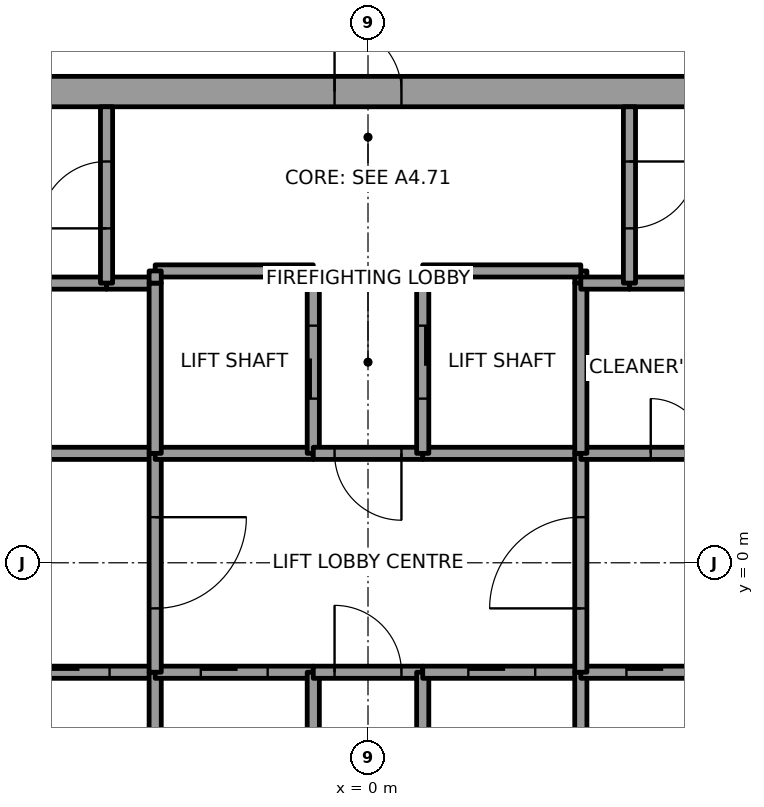
"""IFC4 building model, lengths in metres.
Left out: names, types, materials, properties, quantities, classifications, styles, units other than length and angle.
Written with IfcOpenShell. Run it as: python <this file> out.ifc"""

import sys

from ifc_helpers import new_model, si_unit, direction, frame, frame_2d, origin, place, context, subcontext, project, spatial, rectangle, extrude, element, fill, save


model = new_model("IFC4")
c1 = context("Model", 3, precision=1e-05, world=origin(), true_north=direction((0.0, 1.0)))
c2 = subcontext(c1, "Body", "Model", "MODEL_VIEW")
j1 = project(units=[si_unit("LENGTHUNIT", "METRE"), si_unit("PLANEANGLEUNIT", "RADIAN")], contexts=[c1])
p1 = place(None, origin())
s1 = spatial("IfcSite", under=j1, at=p1, CompositionType="ELEMENT")
p2 = place(p1, origin())
s2 = spatial("IfcBuilding", under=s1, at=p2, CompositionType="ELEMENT")
p3 = place(p2, frame((0.0, 0.0, 303.0)))
s3 = spatial("IfcBuildingStorey", under=s2, at=p3, CompositionType="ELEMENT", Elevation=303.0)
p4 = place(p3, frame((-11.0, 7.75, 0.0), z_axis=(0.0, 0.0, 1.0), x_axis=(1.0, 0.0, 0.0)))
e1 = element("IfcWall", 1, at=p4, inside=s3, PredefinedType="SHEAR", context=c2, shape_type="SweptSolid", body=[
    extrude(rectangle(XDim=22.0, YDim=0.5, at=frame_2d((11.0, 0.0))), origin(), (0.0, 0.0, 1.0), 4.0),
])
p5 = place(p4, frame((10.45, 0.0, 0.0)))
e2 = element("IfcOpeningElement", 2, at=p5, cuts=e1, PredefinedType="OPENING", context=c2, shape_type="SweptSolid", body=[
    extrude(rectangle(XDim=1.1, YDim=2.1, at=frame_2d((0.55, 1.05))), frame((0.0, 0.25, 0.0), z_axis=(0.0, -1.0, 0.0), x_axis=(1.0, 0.0, 0.0)), (0.0, 0.0, 1.0), 0.5),
])
p6 = place(p3, frame((-8.7, 1.8, 0.0), z_axis=(0.0, 0.0, 1.0), x_axis=(1.0, 0.0, 0.0)))
e3 = element("IfcWall", 3, at=p6, inside=s3, PredefinedType="SOLIDWALL", context=c2, shape_type="SweptSolid", body=[
    extrude(rectangle(XDim=5.2, YDim=0.2, at=frame_2d((2.6, 0.0))), origin(), (0.0, 0.0, 1.0), 3.85),
])
p7 = place(p6, frame((2.15, 0.0, 0.0)))
e4 = element("IfcOpeningElement", 4, at=p7, cuts=e3, PredefinedType="OPENING", context=c2, shape_type="SweptSolid", body=[
    extrude(rectangle(XDim=0.9, YDim=2.1, at=frame_2d((0.45, 1.05))), frame((0.0, 0.1, 0.0), z_axis=(0.0, -1.0, 0.0), x_axis=(1.0, 0.0, 0.0)), (0.0, 0.0, 1.0), 0.2),
])
p8 = place(p3, frame((-4.3, 4.6, 0.0), z_axis=(0.0, 0.0, 1.0), x_axis=(-1.0, 0.0, 0.0)))
e5 = element("IfcWall", 5, at=p8, inside=s3, PredefinedType="SOLIDWALL", context=c2, shape_type="SweptSolid", body=[
    extrude(rectangle(XDim=4.4, YDim=0.2, at=frame_2d((2.2, 0.0))), origin(), (0.0, 0.0, 1.0), 3.85),
])
p9 = place(p3, frame((-6.1, -1.8, 0.0), z_axis=(0.0, 0.0, 1.0), x_axis=(1.0, 0.0, 0.0)))
e6 = element("IfcWall", 6, at=p9, inside=s3, PredefinedType="SOLIDWALL", context=c2, shape_type="SweptSolid", body=[
    extrude(rectangle(XDim=2.6, YDim=0.2, at=frame_2d((1.3, 0.0))), origin(), (0.0, 0.0, 1.0), 3.85),
])
p10 = place(p9, frame((0.75, 0.0, 0.0)))
e7 = element("IfcOpeningElement", 7, at=p10, cuts=e6, PredefinedType="OPENING", context=c2, shape_type="SweptSolid", body=[
    extrude(rectangle(XDim=1.1, YDim=2.1, at=frame_2d((0.55, 1.05))), frame((0.0, 0.1, 0.0), z_axis=(0.0, -1.0, 0.0), x_axis=(1.0, 0.0, 0.0)), (0.0, 0.0, 1.0), 0.2),
])
p11 = place(p3, frame((-3.5, 4.6, 0.0), z_axis=(0.0, 0.0, 1.0), x_axis=(-1.0, 0.0, 0.0)))
e8 = element("IfcWall", 8, at=p11, inside=s3, PredefinedType="SOLIDWALL", context=c2, shape_type="SweptSolid", body=[
    extrude(rectangle(XDim=0.8, YDim=0.2, at=frame_2d((0.4, 0.0))), origin(), (0.0, 0.0, 1.0), 3.85),
])
p12 = place(p3, frame((-4.3, 4.6, 0.0), z_axis=(0.0, 0.0, 1.0), x_axis=(0.0, 1.0, 0.0)))
e9 = element("IfcWall", 9, at=p12, inside=s3, PredefinedType="SOLIDWALL", context=c2, shape_type="SweptSolid", body=[
    extrude(rectangle(XDim=2.9, YDim=0.2, at=frame_2d((1.45, 0.0))), origin(), (0.0, 0.0, 1.0), 3.85),
])
p13 = place(p12, frame((0.9, 0.0, 0.0)))
e10 = element("IfcOpeningElement", 10, at=p13, cuts=e9, PredefinedType="OPENING", context=c2, shape_type="SweptSolid", body=[
    extrude(rectangle(XDim=1.1, YDim=2.1, at=frame_2d((0.55, 1.05))), frame((0.0, 0.1, 0.0), z_axis=(0.0, -1.0, 0.0), x_axis=(1.0, 0.0, 0.0)), (0.0, 0.0, 1.0), 0.2),
])
p14 = place(p3, frame((-3.5, -4.6, 0.0), z_axis=(0.0, 0.0, 1.0), x_axis=(0.0, 1.0, 0.0)))
e11 = element("IfcWall", 11, at=p14, inside=s3, PredefinedType="SOLIDWALL", context=c2, shape_type="SweptSolid", body=[
    extrude(rectangle(XDim=2.8, YDim=0.2, at=frame_2d((1.4, 0.0))), origin(), (0.0, 0.0, 1.0), 3.85),
])
p15 = place(p3, frame((-3.5, -1.8, 0.0), z_axis=(0.0, 0.0, 1.0), x_axis=(1.0, 0.0, 0.0)))
e12 = element("IfcWall", 12, at=p15, inside=s3, PredefinedType="SOLIDWALL", context=c2, shape_type="SweptSolid", body=[
    extrude(rectangle(XDim=2.6, YDim=0.2, at=frame_2d((1.3, 0.0))), origin(), (0.0, 0.0, 1.0), 3.85),
])
p16 = place(p15, frame((0.75, 0.0, 0.0)))
e13 = element("IfcOpeningElement", 13, at=p16, cuts=e12, PredefinedType="OPENING", context=c2, shape_type="SweptSolid", body=[
    extrude(rectangle(XDim=1.1, YDim=2.1, at=frame_2d((0.55, 1.05))), frame((0.0, 0.1, 0.0), z_axis=(0.0, -1.0, 0.0), x_axis=(1.0, 0.0, 0.0)), (0.0, 0.0, 1.0), 0.2),
])
p17 = place(p3, frame((-3.5, 1.8, 0.0), z_axis=(0.0, 0.0, 1.0), x_axis=(0.0, -1.0, 0.0)))
e14 = element("IfcWall", 14, at=p17, inside=s3, PredefinedType="SOLIDWALL", context=c2, shape_type="SweptSolid", body=[
    extrude(rectangle(XDim=3.6, YDim=0.2, at=frame_2d((1.8, 0.0))), origin(), (0.0, 0.0, 1.0), 3.85),
])
p18 = place(p17, frame((1.05, 0.0, 0.0)))
e15 = element("IfcOpeningElement", 15, at=p18, cuts=e14, PredefinedType="OPENING", context=c2, shape_type="SweptSolid", body=[
    extrude(rectangle(XDim=1.5, YDim=2.1, at=frame_2d((0.75, 1.05))), frame((0.0, 0.1, 0.0), z_axis=(0.0, -1.0, 0.0), x_axis=(1.0, 0.0, 0.0)), (0.0, 0.0, 1.0), 0.2),
])
p19 = place(p3, frame((-0.9, 1.8, 0.0), z_axis=(0.0, 0.0, 1.0), x_axis=(-1.0, 0.0, 0.0)))
e16 = element("IfcWall", 16, at=p19, inside=s3, PredefinedType="SOLIDWALL", context=c2, shape_type="SweptSolid", body=[
    extrude(rectangle(XDim=2.6, YDim=0.2, at=frame_2d((1.3, 0.0))), origin(), (0.0, 0.0, 1.0), 3.85),
])
p20 = place(p3, frame((-3.5, 1.8, 0.0), z_axis=(0.0, 0.0, 1.0), x_axis=(0.0, 1.0, 0.0)))
e17 = element("IfcWall", 17, at=p20, inside=s3, PredefinedType="SOLIDWALL", context=c2, shape_type="SweptSolid", body=[
    extrude(rectangle(XDim=2.8, YDim=0.2, at=frame_2d((1.4, 0.0))), origin(), (0.0, 0.0, 1.0), 3.85),
])
p21 = place(p3, frame((-0.9, 1.8, 0.0), z_axis=(0.0, 0.0, 1.0), x_axis=(0.0, 1.0, 0.0)))
e18 = element("IfcWall", 18, at=p21, inside=s3, PredefinedType="SOLIDWALL", context=c2, shape_type="SweptSolid", body=[
    extrude(rectangle(XDim=3.0, YDim=0.2, at=frame_2d((1.5, 0.0))), origin(), (0.0, 0.0, 1.0), 3.85),
])
p22 = place(p21, frame((0.9, 0.0, 0.0)))
e19 = element("IfcOpeningElement", 19, at=p22, cuts=e18, PredefinedType="OPENING", context=c2, shape_type="SweptSolid", body=[
    extrude(rectangle(XDim=1.2, YDim=2.1, at=frame_2d((0.6, 1.05))), frame((0.0, 0.1, 0.0), z_axis=(0.0, -1.0, 0.0), x_axis=(1.0, 0.0, 0.0)), (0.0, 0.0, 1.0), 0.2),
])
p23 = place(p3, frame((-0.9, 4.8, 0.0), z_axis=(0.0, 0.0, 1.0), x_axis=(-1.0, 0.0, 0.0)))
e20 = element("IfcWall", 20, at=p23, inside=s3, PredefinedType="SOLIDWALL", context=c2, shape_type="SweptSolid", body=[
    extrude(rectangle(XDim=2.6, YDim=0.2, at=frame_2d((1.3, 0.0))), origin(), (0.0, 0.0, 1.0), 3.85),
])
p24 = place(p3, frame((-3.5, 4.8, 0.0), z_axis=(0.0, 0.0, 1.0), x_axis=(0.0, -1.0, 0.0)))
e21 = element("IfcWall", 21, at=p24, inside=s3, PredefinedType="SOLIDWALL", context=c2, shape_type="SweptSolid", body=[
    extrude(rectangle(XDim=0.2, YDim=0.2, at=frame_2d((0.1, 0.0))), origin(), (0.0, 0.0, 1.0), 3.85),
])
p25 = place(p3, frame((-0.9, -4.6, 0.0), z_axis=(0.0, 0.0, 1.0), x_axis=(0.0, 1.0, 0.0)))
e22 = element("IfcWall", 22, at=p25, inside=s3, PredefinedType="SOLIDWALL", context=c2, shape_type="SweptSolid", body=[
    extrude(rectangle(XDim=2.8, YDim=0.2, at=frame_2d((1.4, 0.0))), origin(), (0.0, 0.0, 1.0), 3.85),
])
p26 = place(p3, frame((-0.9, -1.8, 0.0), z_axis=(0.0, 0.0, 1.0), x_axis=(1.0, 0.0, 0.0)))
e23 = element("IfcWall", 23, at=p26, inside=s3, PredefinedType="SOLIDWALL", context=c2, shape_type="SweptSolid", body=[
    extrude(rectangle(XDim=1.8, YDim=0.2, at=frame_2d((0.9, 0.0))), origin(), (0.0, 0.0, 1.0), 3.85),
])
p27 = place(p26, frame((0.35, 0.0, 0.0)))
e24 = element("IfcOpeningElement", 24, at=p27, cuts=e23, PredefinedType="OPENING", context=c2, shape_type="SweptSolid", body=[
    extrude(rectangle(XDim=1.1, YDim=2.1, at=frame_2d((0.55, 1.05))), frame((0.0, 0.1, 0.0), z_axis=(0.0, -1.0, 0.0), x_axis=(1.0, 0.0, 0.0)), (0.0, 0.0, 1.0), 0.2),
])
p28 = place(p3, frame((0.9, 1.8, 0.0), z_axis=(0.0, 0.0, 1.0), x_axis=(-1.0, 0.0, 0.0)))
e25 = element("IfcWall", 25, at=p28, inside=s3, PredefinedType="SOLIDWALL", context=c2, shape_type="SweptSolid", body=[
    extrude(rectangle(XDim=1.8, YDim=0.2, at=frame_2d((0.9, 0.0))), origin(), (0.0, 0.0, 1.0), 3.85),
])
p29 = place(p28, frame((0.35, 0.0, 0.0)))
e26 = element("IfcOpeningElement", 26, at=p29, cuts=e25, PredefinedType="OPENING", context=c2, shape_type="SweptSolid", body=[
    extrude(rectangle(XDim=1.1, YDim=2.1, at=frame_2d((0.55, 1.05))), frame((0.0, 0.1, 0.0), z_axis=(0.0, -1.0, 0.0), x_axis=(1.0, 0.0, 0.0)), (0.0, 0.0, 1.0), 0.2),
])
p30 = place(p3, frame((0.9, -1.8, 0.0), z_axis=(0.0, 0.0, 1.0), x_axis=(0.0, -1.0, 0.0)))
e27 = element("IfcWall", 27, at=p30, inside=s3, PredefinedType="SOLIDWALL", context=c2, shape_type="SweptSolid", body=[
    extrude(rectangle(XDim=2.8, YDim=0.2, at=frame_2d((1.4, 0.0))), origin(), (0.0, 0.0, 1.0), 3.85),
])
p31 = place(p3, frame((0.9, -1.8, 0.0), z_axis=(0.0, 0.0, 1.0), x_axis=(1.0, 0.0, 0.0)))
e28 = element("IfcWall", 28, at=p31, inside=s3, PredefinedType="SOLIDWALL", context=c2, shape_type="SweptSolid", body=[
    extrude(rectangle(XDim=2.6, YDim=0.2, at=frame_2d((1.3, 0.0))), origin(), (0.0, 0.0, 1.0), 3.85),
])
p32 = place(p31, frame((0.75, 0.0, 0.0)))
e29 = element("IfcOpeningElement", 29, at=p32, cuts=e28, PredefinedType="OPENING", context=c2, shape_type="SweptSolid", body=[
    extrude(rectangle(XDim=1.1, YDim=2.1, at=frame_2d((0.55, 1.05))), frame((0.0, 0.1, 0.0), z_axis=(0.0, -1.0, 0.0), x_axis=(1.0, 0.0, 0.0)), (0.0, 0.0, 1.0), 0.2),
])
p33 = place(p3, frame((3.5, 1.8, 0.0), z_axis=(0.0, 0.0, 1.0), x_axis=(-1.0, 0.0, 0.0)))
e30 = element("IfcWall", 30, at=p33, inside=s3, PredefinedType="SOLIDWALL", context=c2, shape_type="SweptSolid", body=[
    extrude(rectangle(XDim=2.6, YDim=0.2, at=frame_2d((1.3, 0.0))), origin(), (0.0, 0.0, 1.0), 3.85),
])
p34 = place(p3, frame((3.5, 4.6, 0.0), z_axis=(0.0, 0.0, 1.0), x_axis=(0.0, 1.0, 0.0)))
e31 = element("IfcWall", 31, at=p34, inside=s3, PredefinedType="SOLIDWALL", context=c2, shape_type="SweptSolid", body=[
    extrude(rectangle(XDim=0.2, YDim=0.2, at=frame_2d((0.1, 0.0))), origin(), (0.0, 0.0, 1.0), 3.85),
])
p35 = place(p3, frame((3.5, 4.8, 0.0), z_axis=(0.0, 0.0, 1.0), x_axis=(-1.0, 0.0, 0.0)))
e32 = element("IfcWall", 32, at=p35, inside=s3, PredefinedType="SOLIDWALL", context=c2, shape_type="SweptSolid", body=[
    extrude(rectangle(XDim=2.6, YDim=0.2, at=frame_2d((1.3, 0.0))), origin(), (0.0, 0.0, 1.0), 3.85),
])
p36 = place(p3, frame((0.9, 4.8, 0.0), z_axis=(0.0, 0.0, 1.0), x_axis=(0.0, -1.0, 0.0)))
e33 = element("IfcWall", 33, at=p36, inside=s3, PredefinedType="SOLIDWALL", context=c2, shape_type="SweptSolid", body=[
    extrude(rectangle(XDim=3.0, YDim=0.2, at=frame_2d((1.5, 0.0))), origin(), (0.0, 0.0, 1.0), 3.85),
])
p37 = place(p36, frame((0.9, 0.0, 0.0)))
e34 = element("IfcOpeningElement", 34, at=p37, cuts=e33, PredefinedType="OPENING", context=c2, shape_type="SweptSolid", body=[
    extrude(rectangle(XDim=1.2, YDim=2.1, at=frame_2d((0.6, 1.05))), frame((0.0, 0.1, 0.0), z_axis=(0.0, -1.0, 0.0), x_axis=(1.0, 0.0, 0.0)), (0.0, 0.0, 1.0), 0.2),
])
p38 = place(p3, frame((3.5, -4.6, 0.0), z_axis=(0.0, 0.0, 1.0), x_axis=(0.0, 1.0, 0.0)))
e35 = element("IfcWall", 35, at=p38, inside=s3, PredefinedType="SOLIDWALL", context=c2, shape_type="SweptSolid", body=[
    extrude(rectangle(XDim=2.8, YDim=0.2, at=frame_2d((1.4, 0.0))), origin(), (0.0, 0.0, 1.0), 3.85),
])
p39 = place(p3, frame((3.5, -1.8, 0.0), z_axis=(0.0, 0.0, 1.0), x_axis=(1.0, 0.0, 0.0)))
e36 = element("IfcWall", 36, at=p39, inside=s3, PredefinedType="SOLIDWALL", context=c2, shape_type="SweptSolid", body=[
    extrude(rectangle(XDim=2.6, YDim=0.2, at=frame_2d((1.3, 0.0))), origin(), (0.0, 0.0, 1.0), 3.85),
])
p40 = place(p39, frame((0.75, 0.0, 0.0)))
e37 = element("IfcOpeningElement", 37, at=p40, cuts=e36, PredefinedType="OPENING", context=c2, shape_type="SweptSolid", body=[
    extrude(rectangle(XDim=1.1, YDim=2.1, at=frame_2d((0.55, 1.05))), frame((0.0, 0.1, 0.0), z_axis=(0.0, -1.0, 0.0), x_axis=(1.0, 0.0, 0.0)), (0.0, 0.0, 1.0), 0.2),
])
p41 = place(p3, frame((3.5, -1.8, 0.0), z_axis=(0.0, 0.0, 1.0), x_axis=(0.0, 1.0, 0.0)))
e38 = element("IfcWall", 38, at=p41, inside=s3, PredefinedType="SOLIDWALL", context=c2, shape_type="SweptSolid", body=[
    extrude(rectangle(XDim=3.6, YDim=0.2, at=frame_2d((1.8, 0.0))), origin(), (0.0, 0.0, 1.0), 3.85),
])
p42 = place(p41, frame((1.05, 0.0, 0.0)))
e39 = element("IfcOpeningElement", 39, at=p42, cuts=e38, PredefinedType="OPENING", context=c2, shape_type="SweptSolid", body=[
    extrude(rectangle(XDim=1.5, YDim=2.1, at=frame_2d((0.75, 1.05))), frame((0.0, 0.1, 0.0), z_axis=(0.0, -1.0, 0.0), x_axis=(1.0, 0.0, 0.0)), (0.0, 0.0, 1.0), 0.2),
])
p43 = place(p3, frame((3.5, 1.8, 0.0), z_axis=(0.0, 0.0, 1.0), x_axis=(1.0, 0.0, 0.0)))
e40 = element("IfcWall", 40, at=p43, inside=s3, PredefinedType="SOLIDWALL", context=c2, shape_type="SweptSolid", body=[
    extrude(rectangle(XDim=3.2, YDim=0.2, at=frame_2d((1.6, 0.0))), origin(), (0.0, 0.0, 1.0), 3.85),
])
p44 = place(p43, frame((1.15, 0.0, 0.0)))
e41 = element("IfcOpeningElement", 41, at=p44, cuts=e40, PredefinedType="OPENING", context=c2, shape_type="SweptSolid", body=[
    extrude(rectangle(XDim=0.9, YDim=2.1, at=frame_2d((0.45, 1.05))), frame((0.0, 0.1, 0.0), z_axis=(0.0, -1.0, 0.0), x_axis=(1.0, 0.0, 0.0)), (0.0, 0.0, 1.0), 0.2),
])
p45 = place(p3, frame((3.5, 4.6, 0.0), z_axis=(0.0, 0.0, 1.0), x_axis=(0.0, -1.0, 0.0)))
e42 = element("IfcWall", 42, at=p45, inside=s3, PredefinedType="SOLIDWALL", context=c2, shape_type="SweptSolid", body=[
    extrude(rectangle(XDim=2.8, YDim=0.2, at=frame_2d((1.4, 0.0))), origin(), (0.0, 0.0, 1.0), 3.85),
])
p46 = place(p3, frame((4.3, 4.6, 0.0), z_axis=(0.0, 0.0, 1.0), x_axis=(-1.0, 0.0, 0.0)))
e43 = element("IfcWall", 43, at=p46, inside=s3, PredefinedType="SOLIDWALL", context=c2, shape_type="SweptSolid", body=[
    extrude(rectangle(XDim=0.8, YDim=0.2, at=frame_2d((0.4, 0.0))), origin(), (0.0, 0.0, 1.0), 3.85),
])
p47 = place(p3, frame((6.7, 4.6, 0.0), z_axis=(0.0, 0.0, 1.0), x_axis=(-1.0, 0.0, 0.0)))
e44 = element("IfcWall", 44, at=p47, inside=s3, PredefinedType="SOLIDWALL", context=c2, shape_type="SweptSolid", body=[
    extrude(rectangle(XDim=2.4, YDim=0.2, at=frame_2d((1.2, 0.0))), origin(), (0.0, 0.0, 1.0), 3.85),
])
p48 = place(p3, frame((4.3, 7.5, 0.0), z_axis=(0.0, 0.0, 1.0), x_axis=(0.0, -1.0, 0.0)))
e45 = element("IfcWall", 45, at=p48, inside=s3, PredefinedType="SOLIDWALL", context=c2, shape_type="SweptSolid", body=[
    extrude(rectangle(XDim=2.9, YDim=0.2, at=frame_2d((1.45, 0.0))), origin(), (0.0, 0.0, 1.0), 3.85),
])
p49 = place(p48, frame((0.9, 0.0, 0.0)))
e46 = element("IfcOpeningElement", 46, at=p49, cuts=e45, PredefinedType="OPENING", context=c2, shape_type="SweptSolid", body=[
    extrude(rectangle(XDim=1.1, YDim=2.1, at=frame_2d((0.55, 1.05))), frame((0.0, 0.1, 0.0), z_axis=(0.0, -1.0, 0.0), x_axis=(1.0, 0.0, 0.0)), (0.0, 0.0, 1.0), 0.2),
])
p50 = place(p10, origin())
e47 = element("IfcDoor", 47, at=p50, inside=s3, OperationType="SLIDING_TO_RIGHT", PredefinedType="DOOR", context=c2, shape_type="SweptSolid", body=[
    extrude(rectangle(XDim=1.1, YDim=2.1, at=frame_2d((0.55, 1.05))), frame((0.0, 0.025, 0.0), z_axis=(0.0, -1.0, 0.0), x_axis=(1.0, 0.0, 0.0)), (0.0, 0.0, 1.0), 0.05),
])
fill(e7, e47)
p51 = place(p16, origin())
e48 = element("IfcDoor", 48, at=p51, inside=s3, OperationType="SLIDING_TO_LEFT", PredefinedType="DOOR", context=c2, shape_type="SweptSolid", body=[
    extrude(rectangle(XDim=1.1, YDim=2.1, at=frame_2d((0.55, 1.05))), frame((0.0, 0.025, 0.0), z_axis=(0.0, -1.0, 0.0), x_axis=(1.0, 0.0, 0.0)), (0.0, 0.0, 1.0), 0.05),
])
fill(e13, e48)
p52 = place(p32, origin())
e49 = element("IfcDoor", 49, at=p52, inside=s3, OperationType="SLIDING_TO_RIGHT", PredefinedType="DOOR", context=c2, shape_type="SweptSolid", body=[
    extrude(rectangle(XDim=1.1, YDim=2.1, at=frame_2d((0.55, 1.05))), frame((0.0, 0.025, 0.0), z_axis=(0.0, -1.0, 0.0), x_axis=(1.0, 0.0, 0.0)), (0.0, 0.0, 1.0), 0.05),
])
fill(e29, e49)
p53 = place(p40, origin())
e50 = element("IfcDoor", 50, at=p53, inside=s3, OperationType="SLIDING_TO_RIGHT", PredefinedType="DOOR", context=c2, shape_type="SweptSolid", body=[
    extrude(rectangle(XDim=1.1, YDim=2.1, at=frame_2d((0.55, 1.05))), frame((0.0, 0.025, 0.0), z_axis=(0.0, -1.0, 0.0), x_axis=(1.0, 0.0, 0.0)), (0.0, 0.0, 1.0), 0.05),
])
fill(e37, e50)
p54 = place(p22, origin())
e51 = element("IfcDoor", 51, at=p54, inside=s3, OperationType="SLIDING_TO_LEFT", PredefinedType="DOOR", context=c2, shape_type="SweptSolid", body=[
    extrude(rectangle(XDim=1.2, YDim=2.1, at=frame_2d((0.6, 1.05))), frame((0.0, 0.025, 0.0), z_axis=(0.0, -1.0, 0.0), x_axis=(1.0, 0.0, 0.0)), (0.0, 0.0, 1.0), 0.05),
])
fill(e19, e51)
p55 = place(p37, origin())
e52 = element("IfcDoor", 52, at=p55, inside=s3, OperationType="SLIDING_TO_LEFT", PredefinedType="DOOR", context=c2, shape_type="SweptSolid", body=[
    extrude(rectangle(XDim=1.2, YDim=2.1, at=frame_2d((0.6, 1.05))), frame((0.0, 0.025, 0.0), z_axis=(0.0, -1.0, 0.0), x_axis=(1.0, 0.0, 0.0)), (0.0, 0.0, 1.0), 0.05),
])
fill(e34, e52)
p56 = place(p18, origin())
e53 = element("IfcDoor", 53, at=p56, inside=s3, OperationType="DOUBLE_DOOR_SINGLE_SWING", PredefinedType="DOOR", context=c2, shape_type="SweptSolid", body=[
    extrude(rectangle(XDim=1.5, YDim=2.1, at=frame_2d((0.75, 1.05))), frame((0.0, 0.025, 0.0), z_axis=(0.0, -1.0, 0.0), x_axis=(1.0, 0.0, 0.0)), (0.0, 0.0, 1.0), 0.05),
])
fill(e15, e53)
p57 = place(p42, origin())
e54 = element("IfcDoor", 54, at=p57, inside=s3, OperationType="DOUBLE_DOOR_SINGLE_SWING", PredefinedType="DOOR", context=c2, shape_type="SweptSolid", body=[
    extrude(rectangle(XDim=1.5, YDim=2.1, at=frame_2d((0.75, 1.05))), frame((0.0, 0.025, 0.0), z_axis=(0.0, -1.0, 0.0), x_axis=(1.0, 0.0, 0.0)), (0.0, 0.0, 1.0), 0.05),
])
fill(e39, e54)
p58 = place(p29, origin())
e55 = element("IfcDoor", 55, at=p58, inside=s3, OperationType="SINGLE_SWING_LEFT", PredefinedType="DOOR", context=c2, shape_type="SweptSolid", body=[
    extrude(rectangle(XDim=1.1, YDim=2.1, at=frame_2d((0.55, 1.05))), frame((0.0, 0.025, 0.0), z_axis=(0.0, -1.0, 0.0), x_axis=(1.0, 0.0, 0.0)), (0.0, 0.0, 1.0), 0.05),
])
fill(e26, e55)
p59 = place(p27, origin())
e56 = element("IfcDoor", 56, at=p59, inside=s3, OperationType="SINGLE_SWING_LEFT", PredefinedType="DOOR", context=c2, shape_type="SweptSolid", body=[
    extrude(rectangle(XDim=1.1, YDim=2.1, at=frame_2d((0.55, 1.05))), frame((0.0, 0.025, 0.0), z_axis=(0.0, -1.0, 0.0), x_axis=(1.0, 0.0, 0.0)), (0.0, 0.0, 1.0), 0.05),
])
fill(e24, e56)
p60 = place(p13, origin())
e57 = element("IfcDoor", 57, at=p60, inside=s3, OperationType="SINGLE_SWING_LEFT", PredefinedType="DOOR", context=c2, shape_type="SweptSolid", body=[
    extrude(rectangle(XDim=1.1, YDim=2.1, at=frame_2d((0.55, 1.05))), frame((0.0, 0.025, 0.0), z_axis=(0.0, -1.0, 0.0), x_axis=(1.0, 0.0, 0.0)), (0.0, 0.0, 1.0), 0.05),
])
fill(e10, e57)
p61 = place(p49, origin())
e58 = element("IfcDoor", 58, at=p61, inside=s3, OperationType="SINGLE_SWING_RIGHT", PredefinedType="DOOR", context=c2, shape_type="SweptSolid", body=[
    extrude(rectangle(XDim=1.1, YDim=2.1, at=frame_2d((0.55, 1.05))), frame((0.0, 0.025, 0.0), z_axis=(0.0, -1.0, 0.0), x_axis=(1.0, 0.0, 0.0)), (0.0, 0.0, 1.0), 0.05),
])
fill(e46, e58)
p62 = place(p44, origin())
e59 = element("IfcDoor", 59, at=p62, inside=s3, OperationType="SINGLE_SWING_LEFT", PredefinedType="DOOR", context=c2, shape_type="SweptSolid", body=[
    extrude(rectangle(XDim=0.9, YDim=2.1, at=frame_2d((0.45, 1.05))), frame((0.0, 0.025, 0.0), z_axis=(0.0, -1.0, 0.0), x_axis=(1.0, 0.0, 0.0)), (0.0, 0.0, 1.0), 0.05),
])
fill(e41, e59)
p63 = place(p5, origin())
e60 = element("IfcDoor", 60, at=p63, inside=s3, OperationType="SINGLE_SWING_LEFT", PredefinedType="DOOR", context=c2, shape_type="SweptSolid", body=[
    extrude(rectangle(XDim=1.1, YDim=2.1, at=frame_2d((0.55, 1.05))), frame((0.0, 0.025, 0.0), z_axis=(0.0, -1.0, 0.0), x_axis=(1.0, 0.0, 0.0)), (0.0, 0.0, 1.0), 0.05),
])
fill(e2, e60)
save(model, sys.argv[1])
